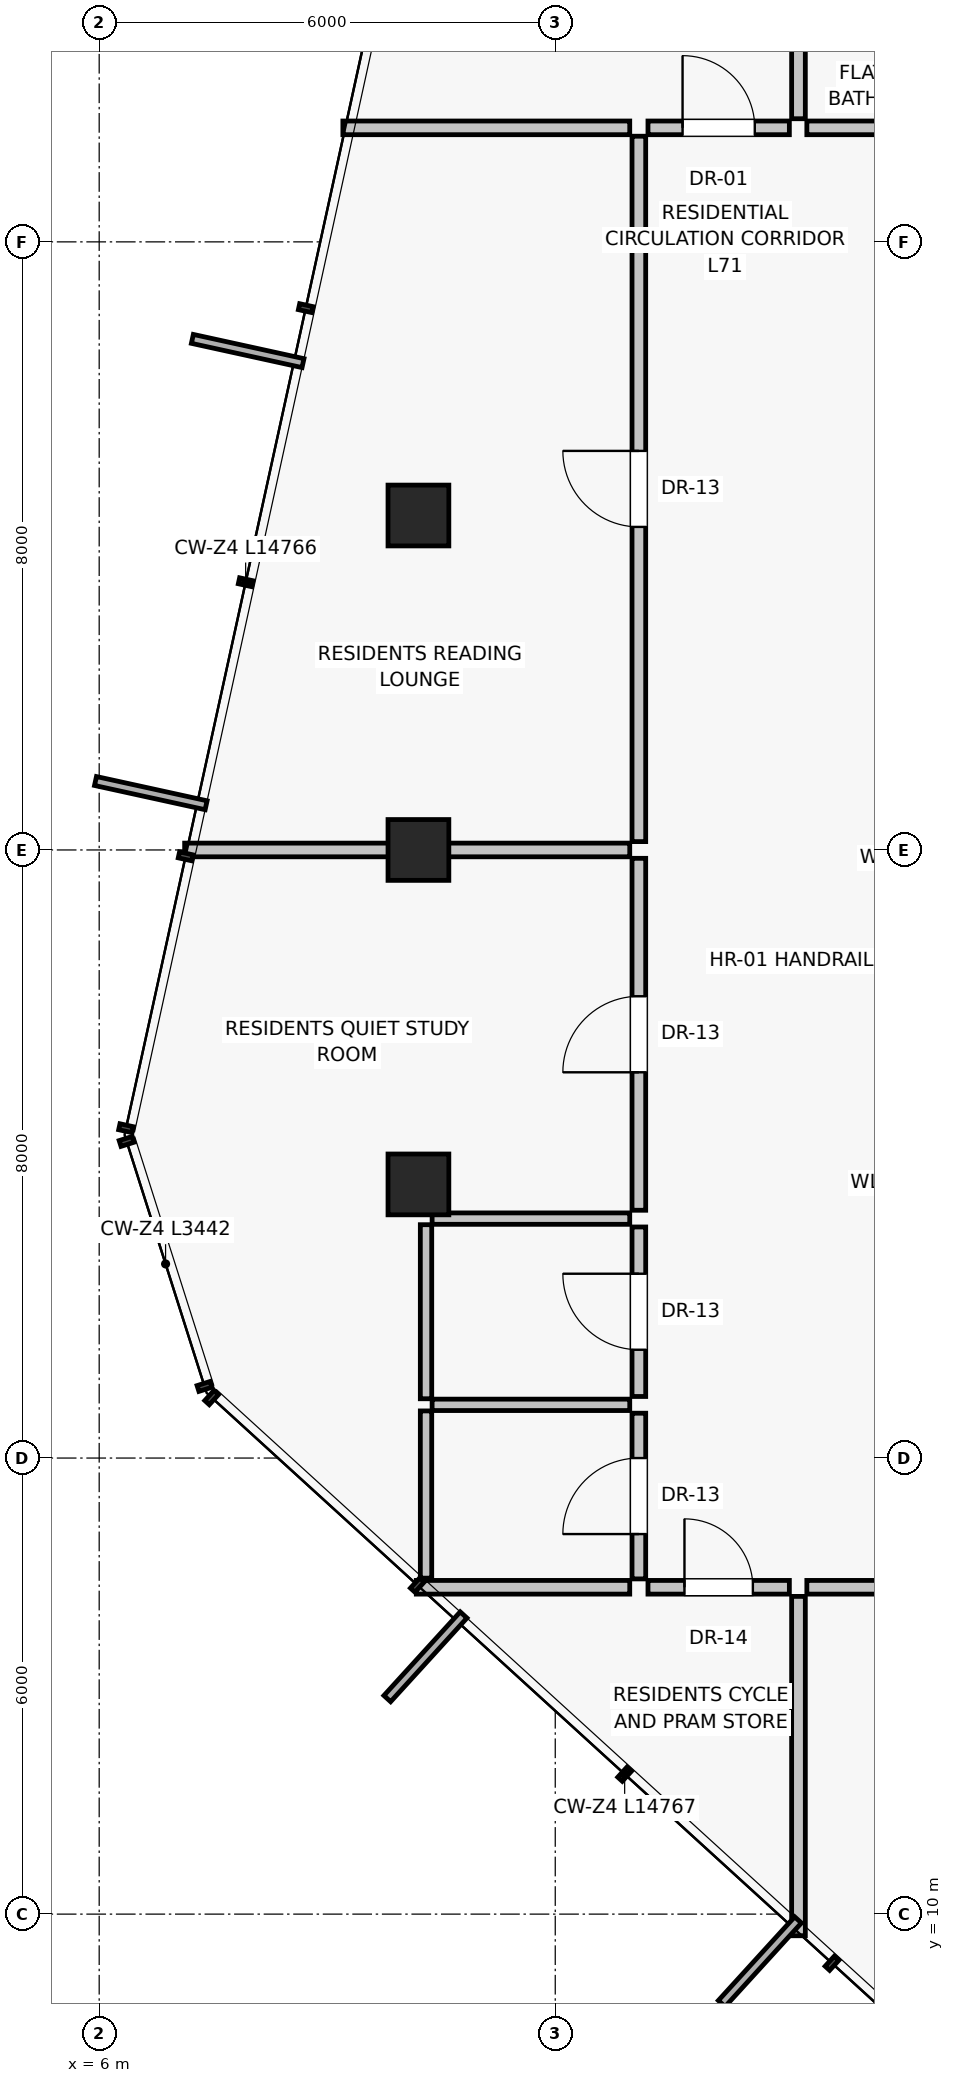
"""IFC4 building model, lengths in metres.
Left out: names, types, materials, properties, quantities, classifications, styles, units other than length and angle.
Written with IfcOpenShell. Run it as: python <this file> out.ifc"""

import sys

from ifc_helpers import new_model, si_unit, direction, frame, frame_2d, origin, origin_2d, place, context, subcontext, project, spatial, rectangle, extrude, source, transform, mapped, element, fill, save


model = new_model("IFC4")
c1 = context("Model", 3, precision=1e-05, world=origin(), true_north=direction((0.0, 1.0)))
c2 = subcontext(c1, "Body", "Model", "MODEL_VIEW")
j1 = project(units=[si_unit("LENGTHUNIT", "METRE"), si_unit("PLANEANGLEUNIT", "RADIAN")], contexts=[c1])
p1 = place(None, origin())
s1 = spatial("IfcSite", under=j1, at=p1, CompositionType="ELEMENT")
p2 = place(p1, origin())
s2 = spatial("IfcBuilding", under=s1, at=p2, CompositionType="ELEMENT")
p3 = place(p2, frame((0.0, 0.0, 251.25)))
s3 = spatial("IfcBuildingStorey", under=s2, at=p3, CompositionType="ELEMENT", Elevation=251.25)
for number, where, z_axis, x_axis in (
    (1, (10.2, 28.4, 0.0), (0.0, 0.0, 1.0), (1.0, 0.0, 0.0)),
    (2, (10.2, 24.0, 0.0), (0.0, 0.0, 1.0), (1.0, 0.0, 0.0)),
    (3, (10.2, 19.6, 0.0), (0.0, 0.0, 1.0), (1.0, 0.0, 0.0)),
):
    element("IfcColumn", number, at=place(p3, frame(where, z_axis=z_axis, x_axis=x_axis)), inside=s3, PredefinedType="COLUMN", context=c2, shape_type="SweptSolid", body=[
        extrude(rectangle(XDim=0.8, YDim=0.8, at=origin_2d()), origin(), (0.0, 0.0, 1.0), 3.25),
    ])
p4 = place(p3, frame((15.2, 14.18, 0.0), z_axis=(0.0, 0.0, 1.0), x_axis=(0.0, -1.0, 0.0)))
e4 = element("IfcWall", 4, at=p4, inside=s3, PredefinedType="PARTITIONING", context=c2, shape_type="SweptSolid", body=[
    extrude(rectangle(XDim=4.464, YDim=0.18, at=frame_2d((2.232, 0.0))), origin(), (0.0, 0.0, 1.0), 3.015),
])
p5 = place(p3, frame((15.31, 14.3, 0.0), z_axis=(0.0, 0.0, 1.0), x_axis=(1.0, 0.0, 0.0)))
e5 = element("IfcWall", 5, at=p5, inside=s3, PredefinedType="PARTITIONING", context=c2, shape_type="SweptSolid", body=[
    extrude(rectangle(XDim=8.05, YDim=0.18, at=frame_2d((4.025, 0.0))), origin(), (0.0, 0.0, 1.0), 3.015),
])
p6 = place(p5, frame((3.125, 0.0, 0.0)))
e6 = element("IfcOpeningElement", 6, at=p6, cuts=e5, PredefinedType="OPENING", context=c2, shape_type="SweptSolid", body=[
    extrude(rectangle(XDim=1.8, YDim=2.25, at=frame_2d((0.9, 1.125))), frame((0.0, 0.1, 0.0), z_axis=(0.0, -1.0, 0.0), x_axis=(1.0, 0.0, 0.0)), (0.0, 0.0, 1.0), 0.2),
])
p7 = place(p3, frame((15.2, 33.62, 0.0), z_axis=(0.0, 0.0, 1.0), x_axis=(0.0, 1.0, 0.0)))
e7 = element("IfcWall", 7, at=p7, inside=s3, PredefinedType="PARTITIONING", context=c2, shape_type="SweptSolid", body=[
    extrude(rectangle(XDim=4.879, YDim=0.18, at=frame_2d((2.44, 0.0))), origin(), (0.0, 0.0, 1.0), 3.015),
])
p8 = place(p3, frame((15.31, 33.5, 0.0), z_axis=(0.0, 0.0, 1.0), x_axis=(1.0, 0.0, 0.0)))
e8 = element("IfcWall", 8, at=p8, inside=s3, PredefinedType="PARTITIONING", context=c2, shape_type="SweptSolid", body=[
    extrude(rectangle(XDim=9.36, YDim=0.18, at=frame_2d((4.68, 0.0))), origin(), (0.0, 0.0, 1.0), 3.015),
])
p9 = place(p8, frame((3.175, 0.0, 0.0)))
e9 = element("IfcOpeningElement", 9, at=p9, cuts=e8, PredefinedType="OPENING", context=c2, shape_type="SweptSolid", body=[
    extrude(rectangle(XDim=0.95, YDim=2.02, at=frame_2d((0.475, 1.01))), frame((0.0, 0.1, 0.0), z_axis=(0.0, -1.0, 0.0), x_axis=(1.0, 0.0, 0.0)), (0.0, 0.0, 1.0), 0.2),
])
p10 = place(p3, frame((12.98, 14.3, 0.0), z_axis=(0.0, 0.0, 1.0), x_axis=(-1.0, 0.0, 0.0)))
e10 = element("IfcWall", 10, at=p10, inside=s3, PredefinedType="PARTITIONING", context=c2, shape_type="SweptSolid", body=[
    extrude(rectangle(XDim=2.808, YDim=0.18, at=frame_2d((1.404, 0.0))), origin(), (0.0, 0.0, 1.0), 3.015),
])
p11 = place(p3, frame((12.98, 33.5, 0.0), z_axis=(0.0, 0.0, 1.0), x_axis=(-1.0, 0.0, 0.0)))
e11 = element("IfcWall", 11, at=p11, inside=s3, PredefinedType="PARTITIONING", context=c2, shape_type="SweptSolid", body=[
    extrude(rectangle(XDim=3.774, YDim=0.18, at=frame_2d((1.887, 0.0))), origin(), (0.0, 0.0, 1.0), 3.015),
])
p12 = place(p3, frame((13.1, 14.41, 0.0), z_axis=(0.0, 0.0, 1.0), x_axis=(0.0, 1.0, 0.0)))
e12 = element("IfcWall", 12, at=p12, inside=s3, PredefinedType="PARTITIONING", context=c2, shape_type="SweptSolid", body=[
    extrude(rectangle(XDim=2.18, YDim=0.18, at=frame_2d((1.09, 0.0))), origin(), (0.0, 0.0, 1.0), 3.015),
])
p13 = place(p12, frame((0.59, 0.0, 0.0)))
e13 = element("IfcOpeningElement", 13, at=p13, cuts=e12, PredefinedType="OPENING", context=c2, shape_type="SweptSolid", body=[
    extrude(rectangle(XDim=1.0, YDim=2.01, at=frame_2d((0.5, 1.005))), frame((0.0, 0.1, 0.0), z_axis=(0.0, -1.0, 0.0), x_axis=(1.0, 0.0, 0.0)), (0.0, 0.0, 1.0), 0.2),
])
p14 = place(p3, frame((13.1, 16.81, 0.0), z_axis=(0.0, 0.0, 1.0), x_axis=(0.0, 1.0, 0.0)))
e14 = element("IfcWall", 14, at=p14, inside=s3, PredefinedType="PARTITIONING", context=c2, shape_type="SweptSolid", body=[
    extrude(rectangle(XDim=2.23, YDim=0.18, at=frame_2d((1.115, 0.0))), origin(), (0.0, 0.0, 1.0), 2.662),
])
p15 = place(p14, frame((0.615, 0.0, 0.0)))
e15 = element("IfcOpeningElement", 15, at=p15, cuts=e14, PredefinedType="OPENING", context=c2, shape_type="SweptSolid", body=[
    extrude(rectangle(XDim=1.0, YDim=2.01, at=frame_2d((0.5, 1.005))), frame((0.0, 0.1, 0.0), z_axis=(0.0, -1.0, 0.0), x_axis=(1.0, 0.0, 0.0)), (0.0, 0.0, 1.0), 0.2),
])
p16 = place(p3, frame((13.1, 19.26, 0.0), z_axis=(0.0, 0.0, 1.0), x_axis=(0.0, 1.0, 0.0)))
e16 = element("IfcWall", 16, at=p16, inside=s3, PredefinedType="PARTITIONING", context=c2, shape_type="SweptSolid", body=[
    extrude(rectangle(XDim=4.63, YDim=0.18, at=frame_2d((2.315, 0.0))), origin(), (0.0, 0.0, 1.0), 2.662),
])
p17 = place(p16, frame((1.815, 0.0, 0.0)))
e17 = element("IfcOpeningElement", 17, at=p17, cuts=e16, PredefinedType="OPENING", context=c2, shape_type="SweptSolid", body=[
    extrude(rectangle(XDim=1.0, YDim=2.01, at=frame_2d((0.5, 1.005))), frame((0.0, 0.1, 0.0), z_axis=(0.0, -1.0, 0.0), x_axis=(1.0, 0.0, 0.0)), (0.0, 0.0, 1.0), 0.2),
])
p18 = place(p3, frame((13.1, 24.11, 0.0), z_axis=(0.0, 0.0, 1.0), x_axis=(0.0, 1.0, 0.0)))
e18 = element("IfcWall", 18, at=p18, inside=s3, PredefinedType="PARTITIONING", context=c2, shape_type="SweptSolid", body=[
    extrude(rectangle(XDim=9.28, YDim=0.18, at=frame_2d((4.64, 0.0))), origin(), (0.0, 0.0, 1.0), 2.662),
])
p19 = place(p18, frame((4.14, 0.0, 0.0)))
e19 = element("IfcOpeningElement", 19, at=p19, cuts=e18, PredefinedType="OPENING", context=c2, shape_type="SweptSolid", body=[
    extrude(rectangle(XDim=1.0, YDim=2.01, at=frame_2d((0.5, 1.005))), frame((0.0, 0.1, 0.0), z_axis=(0.0, -1.0, 0.0), x_axis=(1.0, 0.0, 0.0)), (0.0, 0.0, 1.0), 0.2),
])
for number, where, z_axis, x_axis in (
    (20, (12.98, 16.7, 0.0), (0.0, 0.0, 1.0), (-1.0, 0.0, 0.0)),
    (21, (12.98, 19.15, 0.0), (0.0, 0.0, 1.0), (-1.0, 0.0, 0.0)),
):
    element("IfcWall", number, at=place(p3, frame(where, z_axis=z_axis, x_axis=x_axis)), inside=s3, PredefinedType="PARTITIONING", context=c2, shape_type="SweptSolid", body=[
        extrude(rectangle(XDim=2.6, YDim=0.15, at=frame_2d((1.3, 0.0))), origin(), (0.0, 0.0, 1.0), 3.015),
    ])
p20 = place(p3, frame((10.3, 14.42, 0.0), z_axis=(0.0, 0.0, 1.0), x_axis=(0.0, 1.0, 0.0)))
e22 = element("IfcWall", 22, at=p20, inside=s3, PredefinedType="PARTITIONING", context=c2, shape_type="SweptSolid", body=[
    extrude(rectangle(XDim=2.2, YDim=0.15, at=frame_2d((1.1, 0.0))), origin(), (0.0, 0.0, 1.0), 3.015),
])
p21 = place(p3, frame((10.3, 16.78, 0.0), z_axis=(0.0, 0.0, 1.0), x_axis=(0.0, 1.0, 0.0)))
e23 = element("IfcWall", 23, at=p21, inside=s3, PredefinedType="PARTITIONING", context=c2, shape_type="SweptSolid", body=[
    extrude(rectangle(XDim=2.29, YDim=0.15, at=frame_2d((1.145, 0.0))), origin(), (0.0, 0.0, 1.0), 3.015),
])
p22 = place(p3, frame((12.98, 24.0, 0.0), z_axis=(0.0, 0.0, 1.0), x_axis=(-1.0, 0.0, 0.0)))
e24 = element("IfcWall", 24, at=p22, inside=s3, PredefinedType="PARTITIONING", context=c2, shape_type="SweptSolid", body=[
    extrude(rectangle(XDim=5.855, YDim=0.18, at=frame_2d((2.928, 0.0))), origin(), (0.0, 0.0, 1.0), 3.015),
])
p23 = place(p3, frame((13.22, 14.3, 0.0), z_axis=(0.0, 0.0, 1.0), x_axis=(1.0, 0.0, 0.0)))
e25 = element("IfcWall", 25, at=p23, inside=s3, PredefinedType="PARTITIONING", context=c2, shape_type="SweptSolid", body=[
    extrude(rectangle(XDim=1.86, YDim=0.18, at=frame_2d((0.93, 0.0))), origin(), (0.0, 0.0, 1.0), 3.015),
])
p24 = place(p23, frame((0.48, 0.0, 0.0)))
e26 = element("IfcOpeningElement", 26, at=p24, cuts=e25, PredefinedType="OPENING", context=c2, shape_type="SweptSolid", body=[
    extrude(rectangle(XDim=0.9, YDim=2.01, at=frame_2d((0.45, 1.005))), frame((0.0, 0.1, 0.0), z_axis=(0.0, -1.0, 0.0), x_axis=(1.0, 0.0, 0.0)), (0.0, 0.0, 1.0), 0.2),
])
p25 = place(p3, frame((13.22, 33.5, 0.0), z_axis=(0.0, 0.0, 1.0), x_axis=(1.0, 0.0, 0.0)))
e27 = element("IfcWall", 27, at=p25, inside=s3, PredefinedType="PARTITIONING", context=c2, shape_type="SweptSolid", body=[
    extrude(rectangle(XDim=1.86, YDim=0.18, at=frame_2d((0.93, 0.0))), origin(), (0.0, 0.0, 1.0), 3.015),
])
p26 = place(p25, frame((0.455, 0.0, 0.0)))
e28 = element("IfcOpeningElement", 28, at=p26, cuts=e27, PredefinedType="OPENING", context=c2, shape_type="SweptSolid", body=[
    extrude(rectangle(XDim=0.95, YDim=2.02, at=frame_2d((0.475, 1.01))), frame((0.0, 0.1, 0.0), z_axis=(0.0, -1.0, 0.0), x_axis=(1.0, 0.0, 0.0)), (0.0, 0.0, 1.0), 0.2),
])
m1 = source(origin(), c2, "Body", "SweptSolid", [
    extrude(rectangle(XDim=1.0, YDim=2.01, at=frame_2d((0.5, 1.005))), frame((0.0, 0.025, 0.0), z_axis=(0.0, -1.0, 0.0), x_axis=(1.0, 0.0, 0.0)), (0.0, 0.0, 1.0), 0.05),
])
p27 = place(p13, origin())
e29 = element("IfcDoor", 29, at=p27, inside=s3, OperationType="SINGLE_SWING_LEFT", PredefinedType="DOOR", context=c2, shape_type="MappedRepresentation", body=[
    mapped(m1, transform((0.0, 0.0, 0.0), scale=1.0)),
])
fill(e13, e29)
p28 = place(p15, origin())
e30 = element("IfcDoor", 30, at=p28, inside=s3, OperationType="SINGLE_SWING_RIGHT", PredefinedType="DOOR", context=c2, shape_type="MappedRepresentation", body=[
    mapped(m1, transform((0.0, 0.0, 0.0), scale=1.0)),
])
fill(e15, e30)
p29 = place(p17, origin())
e31 = element("IfcDoor", 31, at=p29, inside=s3, OperationType="SINGLE_SWING_LEFT", PredefinedType="DOOR", context=c2, shape_type="MappedRepresentation", body=[
    mapped(m1, transform((0.0, 0.0, 0.0), scale=1.0)),
])
fill(e17, e31)
p30 = place(p19, origin())
e32 = element("IfcDoor", 32, at=p30, inside=s3, OperationType="SINGLE_SWING_RIGHT", PredefinedType="DOOR", context=c2, shape_type="MappedRepresentation", body=[
    mapped(m1, transform((0.0, 0.0, 0.0), scale=1.0)),
])
fill(e19, e32)
m2 = source(origin(), c2, "Body", "SweptSolid", [
    extrude(rectangle(XDim=0.9, YDim=2.01, at=frame_2d((0.45, 1.005))), frame((0.0, 0.025, 0.0), z_axis=(0.0, -1.0, 0.0), x_axis=(1.0, 0.0, 0.0)), (0.0, 0.0, 1.0), 0.05),
])
p31 = place(p24, origin())
e33 = element("IfcDoor", 33, at=p31, inside=s3, OperationType="SINGLE_SWING_LEFT", PredefinedType="DOOR", context=c2, shape_type="MappedRepresentation", body=[
    mapped(m2, transform((0.0, 0.0, 0.0), scale=1.0)),
])
fill(e26, e33)
m3 = source(origin(), c2, "Body", "SweptSolid", [
    extrude(rectangle(XDim=0.95, YDim=2.02, at=frame_2d((0.475, 1.01))), frame((0.0, 0.025, 0.0), z_axis=(0.0, -1.0, 0.0), x_axis=(1.0, 0.0, 0.0)), (0.0, 0.0, 1.0), 0.05),
])
p32 = place(p26, origin())
e34 = element("IfcDoor", 34, at=p32, inside=s3, OperationType="SINGLE_SWING_LEFT", PredefinedType="DOOR", context=c2, shape_type="MappedRepresentation", body=[
    mapped(m3, transform((0.0, 0.0, 0.0), scale=1.0)),
])
fill(e28, e34)
save(model, sys.argv[1])
